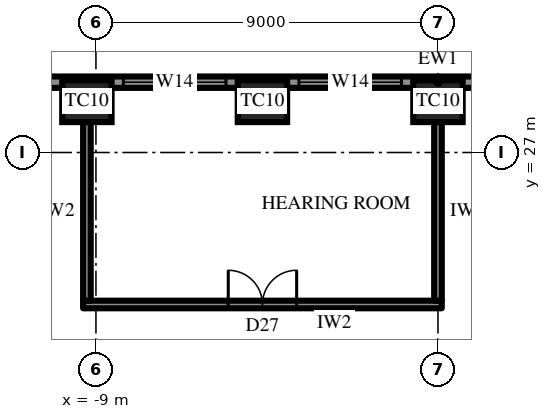
"""IFC4 building model, lengths in metres.
Left out: names, types, materials, properties, quantities, classifications, styles, units other than length and angle.
Written with IfcOpenShell. Run it as: python <this file> out.ifc"""

import sys

from ifc_helpers import new_model, si_unit, direction, frame, frame_2d, origin, origin_2d, place, context, subcontext, project, spatial, rectangle, extrude, element, fill, save


model = new_model("IFC4")
c1 = context("Model", 3, precision=1e-05, world=origin(), true_north=direction((0.0, 1.0)))
c2 = subcontext(c1, "Body", "Model", "MODEL_VIEW")
j1 = project(units=[si_unit("LENGTHUNIT", "METRE"), si_unit("PLANEANGLEUNIT", "RADIAN")], contexts=[c1])
p1 = place(None, origin())
s1 = spatial("IfcSite", under=j1, at=p1, CompositionType="ELEMENT")
p2 = place(p1, origin())
s2 = spatial("IfcBuilding", under=s1, at=p2, CompositionType="ELEMENT")
p3 = place(p2, frame((0.0, 0.0, 236.5)))
s3 = spatial("IfcBuildingStorey", under=s2, at=p3, CompositionType="ELEMENT", Elevation=236.5)
for number, where, z_axis, x_axis in (
    (1, (0.0, 28.35, 0.0), (0.0, 0.0, 1.0), (-1.0, 0.0, 0.0)),
    (2, (-4.619, 28.35, 0.0), (0.0, 0.0, 1.0), (-1.0, 0.0, 0.0)),
    (3, (-9.238, 28.35, 0.0), (0.0, 0.0, 1.0), (-1.0, 0.0, 0.0)),
):
    element("IfcColumn", number, at=place(p3, frame(where, z_axis=z_axis, x_axis=x_axis)), inside=s3, PredefinedType="COLUMN", context=c2, shape_type="SweptSolid", body=[
        extrude(rectangle(XDim=1.3, YDim=1.1, at=origin_2d()), origin(), (0.0, 0.0, 1.0), 4.2),
    ])
p4 = place(p3, frame((12.556, 28.85, 0.0), z_axis=(0.0, 0.0, 1.0), x_axis=(-1.0, 0.0, 0.0)))
e4 = element("IfcWall", 4, at=p4, inside=s3, PredefinedType="SOLIDWALL", context=c2, shape_type="SweptSolid", body=[
    extrude(rectangle(XDim=25.113, YDim=0.3, at=frame_2d((12.556, 0.0))), origin(), (0.0, 0.0, 1.0), 2.8),
])
p5 = place(p4, frame((4.278, 0.0, 0.6)))
e5 = element("IfcOpeningElement", 5, at=p5, cuts=e4, PredefinedType="OPENING", context=c2, shape_type="SweptSolid", body=[
    extrude(rectangle(XDim=2.7, YDim=1.95, at=frame_2d((1.35, 0.975))), frame((0.0, 0.16, 0.0), z_axis=(0.0, -1.0, 0.0), x_axis=(1.0, 0.0, 0.0)), (0.0, 0.0, 1.0), 0.32),
])
p6 = place(p4, frame((9.647, 0.0, 0.0)))
e6 = element("IfcOpeningElement", 6, at=p6, cuts=e4, PredefinedType="OPENING", context=c2, shape_type="SweptSolid", body=[
    extrude(rectangle(XDim=1.2, YDim=2.4, at=frame_2d((0.6, 1.2))), frame((0.0, 0.16, 0.0), z_axis=(0.0, -1.0, 0.0), x_axis=(1.0, 0.0, 0.0)), (0.0, 0.0, 1.0), 0.32),
])
p7 = place(p4, frame((13.516, 0.0, 0.6)))
e7 = element("IfcOpeningElement", 7, at=p7, cuts=e4, PredefinedType="OPENING", context=c2, shape_type="SweptSolid", body=[
    extrude(rectangle(XDim=2.7, YDim=1.95, at=frame_2d((1.35, 0.975))), frame((0.0, 0.16, 0.0), z_axis=(0.0, -1.0, 0.0), x_axis=(1.0, 0.0, 0.0)), (0.0, 0.0, 1.0), 0.32),
])
p8 = place(p4, frame((18.135, 0.0, 0.6)))
e8 = element("IfcOpeningElement", 8, at=p8, cuts=e4, PredefinedType="OPENING", context=c2, shape_type="SweptSolid", body=[
    extrude(rectangle(XDim=2.7, YDim=1.95, at=frame_2d((1.35, 0.975))), frame((0.0, 0.16, 0.0), z_axis=(0.0, -1.0, 0.0), x_axis=(1.0, 0.0, 0.0)), (0.0, 0.0, 1.0), 0.32),
])
p9 = place(p3, frame((0.1, 23.0, 0.0), z_axis=(0.0, 0.0, 1.0), x_axis=(-1.0, 0.0, 0.0)))
e9 = element("IfcWall", 9, at=p9, inside=s3, PredefinedType="PARTITIONING", context=c2, shape_type="SweptSolid", body=[
    extrude(rectangle(XDim=9.438, YDim=0.2, at=frame_2d((4.719, 0.0))), origin(), (0.0, 0.0, 1.0), 4.0),
])
p10 = place(p9, frame((3.819, 0.0, 0.0)))
e10 = element("IfcOpeningElement", 10, at=p10, cuts=e9, PredefinedType="OPENING", context=c2, shape_type="SweptSolid", body=[
    extrude(rectangle(XDim=1.8, YDim=2.4, at=frame_2d((0.9, 1.2))), frame((0.0, 0.11, 0.0), z_axis=(0.0, -1.0, 0.0), x_axis=(1.0, 0.0, 0.0)), (0.0, 0.0, 1.0), 0.22),
])
for number, where, z_axis, x_axis in (
    (11, (0.0, 23.1, 0.0), (0.0, 0.0, 1.0), (0.0, 1.0, 0.0)),
    (12, (-9.238, 23.1, 0.0), (0.0, 0.0, 1.0), (0.0, 1.0, 0.0)),
):
    element("IfcWall", number, at=place(p3, frame(where, z_axis=z_axis, x_axis=x_axis)), inside=s3, PredefinedType="PARTITIONING", context=c2, shape_type="SweptSolid", body=[
        extrude(rectangle(XDim=4.7, YDim=0.2, at=frame_2d((2.35, 0.0))), origin(), (0.0, 0.0, 1.0), 2.992),
    ])
p11 = place(p7, origin())
e13 = element("IfcWindow", 13, at=p11, inside=s3, PartitioningType="SINGLE_PANEL", PredefinedType="WINDOW", context=c2, shape_type="SweptSolid", body=[
    extrude(rectangle(XDim=2.7, YDim=1.95, at=frame_2d((1.35, 0.975))), frame((0.0, 0.03, 0.0), z_axis=(0.0, -1.0, 0.0), x_axis=(1.0, 0.0, 0.0)), (0.0, 0.0, 1.0), 0.06),
])
fill(e7, e13)
p12 = place(p8, origin())
e14 = element("IfcWindow", 14, at=p12, inside=s3, PartitioningType="SINGLE_PANEL", PredefinedType="WINDOW", context=c2, shape_type="SweptSolid", body=[
    extrude(rectangle(XDim=2.7, YDim=1.95, at=frame_2d((1.35, 0.975))), frame((0.0, 0.03, 0.0), z_axis=(0.0, -1.0, 0.0), x_axis=(1.0, 0.0, 0.0)), (0.0, 0.0, 1.0), 0.06),
])
fill(e8, e14)
p13 = place(p10, frame((1.8, 0.0, 0.0), z_axis=(0.0, 0.0, 1.0), x_axis=(-1.0, 0.0, 0.0)))
e15 = element("IfcDoor", 15, at=p13, inside=s3, OperationType="DOUBLE_DOOR_SINGLE_SWING", PredefinedType="DOOR", context=c2, shape_type="SweptSolid", body=[
    extrude(rectangle(XDim=1.8, YDim=2.4, at=frame_2d((0.9, 1.2))), frame((0.0, 0.025, 0.0), z_axis=(0.0, -1.0, 0.0), x_axis=(1.0, 0.0, 0.0)), (0.0, 0.0, 1.0), 0.05),
])
fill(e10, e15)
save(model, sys.argv[1])
